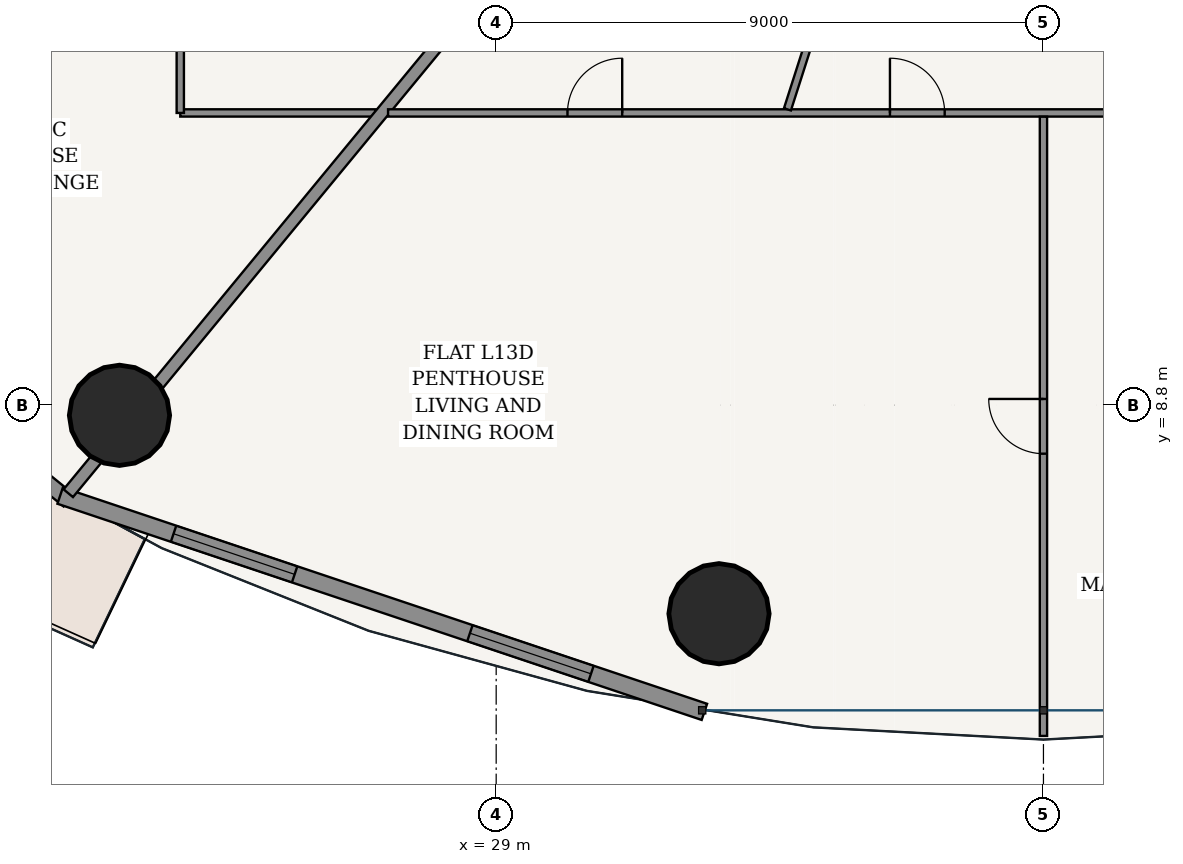
"""IFC4 building model, lengths in metres.
Left out: names, types, materials, properties, quantities, classifications, styles, units other than length and angle.
Written with IfcOpenShell. Run it as: python <this file> out.ifc"""

import sys

from ifc_helpers import new_model, si_unit, direction, frame, frame_2d, origin, origin_2d, place, context, subcontext, project, spatial, rectangle, hollow_circle, extrude, source, transform, mapped, element, fill, save


model = new_model("IFC4")
c1 = context("Model", 3, precision=1e-05, world=origin(), true_north=direction((-0.2419218956, 0.970295726276)))
c2 = subcontext(c1, "Body", "Model", "MODEL_VIEW")
j1 = project(units=[si_unit("LENGTHUNIT", "METRE"), si_unit("PLANEANGLEUNIT", "RADIAN")], contexts=[c1])
p1 = place(None, origin())
s1 = spatial("IfcSite", under=j1, at=p1, CompositionType="ELEMENT")
p2 = place(p1, origin())
s2 = spatial("IfcBuilding", under=s1, at=p2, CompositionType="ELEMENT")
p3 = place(p2, frame((0.0, 0.0, 52.8)))
s3 = spatial("IfcBuildingStorey", under=s2, at=p3, CompositionType="ELEMENT", Elevation=52.8)
for number, where, z_axis, x_axis in (
    (1, (22.805, 8.632, 0.0), (0.0, 0.0, 1.0), (1.0, 0.0, 0.0)),
    (2, (32.664, 5.37, 0.0), (0.0, 0.0, 1.0), (1.0, 0.0, 0.0)),
):
    element("IfcColumn", number, at=place(p3, frame(where, z_axis=z_axis, x_axis=x_axis)), inside=s3, PredefinedType="COLUMN", context=c2, shape_type="SweptSolid", body=[
        extrude(hollow_circle(Radius=0.825, WallThickness=0.05, at=origin_2d()), origin(), (0.0, 0.0, 1.0), 3.6),
    ])
p4 = place(p3, frame((13.85, 13.811, 0.0), z_axis=(0.0, 0.0, 1.0), x_axis=(0.777016782851, -0.629479879875, 0.0)))
e3 = element("IfcWall", 3, at=p4, inside=s3, PredefinedType="SOLIDWALL", context=c2, shape_type="SweptSolid", body=[
    extrude(rectangle(XDim=10.447, YDim=0.26, at=frame_2d((5.223, 0.0))), origin(), (0.0, 0.0, 1.0), 3.32),
])
p5 = place(p4, frame((4.548, 0.0, 0.0)))
e4 = element("IfcOpeningElement", 4, at=p5, cuts=e3, PredefinedType="OPENING", context=c2, shape_type="SweptSolid", body=[
    extrude(rectangle(XDim=1.35, YDim=2.2, at=frame_2d((0.675, 1.1))), frame((0.0, 0.14, 0.0), z_axis=(0.0, -1.0, 0.0), x_axis=(1.0, 0.0, 0.0)), (0.0, 0.0, 1.0), 0.28),
])
p6 = place(p3, frame((21.829, 7.311, 0.0), z_axis=(0.0, 0.0, 1.0), x_axis=(0.948047847546, -0.31812777113, 0.0)))
e5 = element("IfcWall", 5, at=p6, inside=s3, PredefinedType="SOLIDWALL", context=c2, shape_type="SweptSolid", body=[
    extrude(rectangle(XDim=11.175, YDim=0.28, at=frame_2d((5.588, 0.0))), origin(), (0.0, 0.0, 1.0), 3.32),
])
p7 = place(p6, frame((1.967, 0.0, 0.85)))
e6 = element("IfcOpeningElement", 6, at=p7, cuts=e5, PredefinedType="OPENING", context=c2, shape_type="SweptSolid", body=[
    extrude(rectangle(XDim=2.1, YDim=1.95, at=frame_2d((1.05, 0.975))), frame((0.0, 0.15, 0.0), z_axis=(0.0, -1.0, 0.0), x_axis=(1.0, 0.0, 0.0)), (0.0, 0.0, 1.0), 0.3),
])
p8 = place(p6, frame((7.108, 0.0, 0.85)))
e7 = element("IfcOpeningElement", 7, at=p8, cuts=e5, PredefinedType="OPENING", context=c2, shape_type="SweptSolid", body=[
    extrude(rectangle(XDim=2.1, YDim=1.95, at=frame_2d((1.05, 0.975))), frame((0.0, 0.15, 0.0), z_axis=(0.0, -1.0, 0.0), x_axis=(1.0, 0.0, 0.0)), (0.0, 0.0, 1.0), 0.3),
])
p9 = place(p3, frame((27.018, 13.605, 0.0), z_axis=(0.0, 0.0, 1.0), x_axis=(-1.0, 0.0, 0.0)))
e8 = element("IfcWall", 8, at=p9, inside=s3, PredefinedType="PARTITIONING", context=c2, shape_type="SweptSolid", body=[
    extrude(rectangle(XDim=3.213, YDim=0.12, at=frame_2d((1.606, 0.0))), origin(), (0.0, 0.0, 1.0), 2.688),
])
p10 = place(p3, frame((23.805, 13.605, 0.0), z_axis=(0.0, 0.0, 1.0), x_axis=(0.0, 1.0, 0.0)))
e9 = element("IfcWall", 9, at=p10, inside=s3, PredefinedType="PARTITIONING", context=c2, shape_type="SweptSolid", body=[
    extrude(rectangle(XDim=20.779, YDim=0.12, at=frame_2d((10.39, 0.0))), origin(), (0.0, 0.0, 1.0), 2.688),
])
p11 = place(p10, frame((2.425, 0.0, 0.0)))
e10 = element("IfcOpeningElement", 10, at=p11, cuts=e9, PredefinedType="OPENING", context=c2, shape_type="SweptSolid", body=[
    extrude(rectangle(XDim=0.9, YDim=2.15, at=frame_2d((0.45, 1.075))), frame((0.0, 0.07, 0.0), z_axis=(0.0, -1.0, 0.0), x_axis=(1.0, 0.0, 0.0)), (0.0, 0.0, 1.0), 0.14),
])
p12 = place(p10, frame((14.199, 0.0, 0.0)))
e11 = element("IfcOpeningElement", 11, at=p12, cuts=e9, PredefinedType="OPENING", context=c2, shape_type="SweptSolid", body=[
    extrude(rectangle(XDim=0.9, YDim=2.15, at=frame_2d((0.45, 1.075))), frame((0.0, 0.07, 0.0), z_axis=(0.0, -1.0, 0.0), x_axis=(1.0, 0.0, 0.0)), (0.0, 0.0, 1.0), 0.14),
])
p13 = place(p10, frame((17.908, 0.0, 0.0)))
e12 = element("IfcOpeningElement", 12, at=p13, cuts=e9, PredefinedType="OPENING", context=c2, shape_type="SweptSolid", body=[
    extrude(rectangle(XDim=0.9, YDim=2.15, at=frame_2d((0.45, 1.075))), frame((0.0, 0.07, 0.0), z_axis=(0.0, -1.0, 0.0), x_axis=(1.0, 0.0, 0.0)), (0.0, 0.0, 1.0), 0.14),
])
p14 = place(p3, frame((23.75, 19.084, 0.0), z_axis=(0.0, 0.0, 1.0), x_axis=(-0.879370672984, -0.476137815654, 0.0)))
e13 = element("IfcWall", 13, at=p14, inside=s3, PredefinedType="PARTITIONING", context=c2, shape_type="SweptSolid", body=[
    extrude(rectangle(XDim=11.094, YDim=0.12, at=frame_2d((5.547, 0.0))), origin(), (0.0, 0.0, 1.0), 2.688),
])
p15 = place(p14, frame((4.034, 0.0, 0.0)))
e14 = element("IfcOpeningElement", 14, at=p15, cuts=e13, PredefinedType="OPENING", context=c2, shape_type="SweptSolid", body=[
    extrude(rectangle(XDim=0.9, YDim=2.15, at=frame_2d((0.45, 1.075))), frame((0.0, 0.07, 0.0), z_axis=(0.0, -1.0, 0.0), x_axis=(1.0, 0.0, 0.0)), (0.0, 0.0, 1.0), 0.14),
])
p16 = place(p3, frame((29.396, 16.365, 0.0), z_axis=(0.0, 0.0, 1.0), x_axis=(-0.636186165667, -0.771535587393, 0.0)))
e15 = element("IfcWall", 15, at=p16, inside=s3, PredefinedType="PARTITIONING", context=c2, shape_type="SweptSolid", body=[
    extrude(rectangle(XDim=11.683, YDim=0.2, at=frame_2d((5.842, 0.0))), origin(), (0.0, 0.0, 1.0), 2.688),
])
p17 = place(p3, frame((52.195, 13.605, 0.0), z_axis=(0.0, 0.0, 1.0), x_axis=(-1.0, 0.0, 0.0)))
e16 = element("IfcWall", 16, at=p17, inside=s3, PredefinedType="PARTITIONING", context=c2, shape_type="SweptSolid", body=[
    extrude(rectangle(XDim=24.973, YDim=0.12, at=frame_2d((12.487, 0.0))), origin(), (0.0, 0.0, 1.0), 2.688),
])
p18 = place(p17, frame((3.841, 0.0, 0.0)))
e17 = element("IfcOpeningElement", 17, at=p18, cuts=e16, PredefinedType="OPENING", context=c2, shape_type="SweptSolid", body=[
    extrude(rectangle(XDim=0.9, YDim=2.15, at=frame_2d((0.45, 1.075))), frame((0.0, 0.07, 0.0), z_axis=(0.0, -1.0, 0.0), x_axis=(1.0, 0.0, 0.0)), (0.0, 0.0, 1.0), 0.14),
])
p19 = place(p17, frame((15.819, 0.0, 0.0)))
e18 = element("IfcOpeningElement", 18, at=p19, cuts=e16, PredefinedType="OPENING", context=c2, shape_type="SweptSolid", body=[
    extrude(rectangle(XDim=0.9, YDim=2.15, at=frame_2d((0.45, 1.075))), frame((0.0, 0.07, 0.0), z_axis=(0.0, -1.0, 0.0), x_axis=(1.0, 0.0, 0.0)), (0.0, 0.0, 1.0), 0.14),
])
p20 = place(p17, frame((21.123, 0.0, 0.0)))
e19 = element("IfcOpeningElement", 19, at=p20, cuts=e16, PredefinedType="OPENING", context=c2, shape_type="SweptSolid", body=[
    extrude(rectangle(XDim=0.9, YDim=2.15, at=frame_2d((0.45, 1.075))), frame((0.0, 0.07, 0.0), z_axis=(0.0, -1.0, 0.0), x_axis=(1.0, 0.0, 0.0)), (0.0, 0.0, 1.0), 0.14),
])
p21 = place(p3, frame((38.0, 13.543, 0.0), z_axis=(0.0, 0.0, 1.0), x_axis=(0.0, -1.0, 0.0)))
e20 = element("IfcWall", 20, at=p21, inside=s3, PredefinedType="PARTITIONING", context=c2, shape_type="SweptSolid", body=[
    extrude(rectangle(XDim=10.183, YDim=0.12, at=frame_2d((5.091, 0.0))), origin(), (0.0, 0.0, 1.0), 2.762),
])
p22 = place(p21, frame((4.642, 0.0, 0.0)))
e21 = element("IfcOpeningElement", 21, at=p22, cuts=e20, PredefinedType="OPENING", context=c2, shape_type="SweptSolid", body=[
    extrude(rectangle(XDim=0.9, YDim=2.15, at=frame_2d((0.45, 1.075))), frame((0.0, 0.07, 0.0), z_axis=(0.0, -1.0, 0.0), x_axis=(1.0, 0.0, 0.0)), (0.0, 0.0, 1.0), 0.14),
])
p23 = place(p3, frame((34.656, 16.365, 0.0), z_axis=(0.0, 0.0, 1.0), x_axis=(-0.305153630579, -0.952303135427, 0.0)))
e22 = element("IfcWall", 22, at=p23, inside=s3, PredefinedType="PARTITIONING", context=c2, shape_type="SweptSolid", body=[
    extrude(rectangle(XDim=2.836, YDim=0.12, at=frame_2d((1.418, 0.0))), origin(), (0.0, 0.0, 1.0), 3.32),
])
m1 = source(origin(), c2, "Body", "SweptSolid", [
    extrude(rectangle(XDim=2.1, YDim=1.95, at=frame_2d((1.05, 0.975))), frame((0.0, 0.03, 0.0), z_axis=(0.0, -1.0, 0.0), x_axis=(1.0, 0.0, 0.0)), (0.0, 0.0, 1.0), 0.06),
])
p24 = place(p7, origin())
e23 = element("IfcWindow", 23, at=p24, inside=s3, PartitioningType="SINGLE_PANEL", PredefinedType="WINDOW", context=c2, shape_type="MappedRepresentation", body=[
    mapped(m1, transform((0.0, 0.0, 0.0), scale=1.0)),
])
fill(e6, e23)
p25 = place(p8, origin())
e24 = element("IfcWindow", 24, at=p25, inside=s3, PartitioningType="SINGLE_PANEL", PredefinedType="WINDOW", context=c2, shape_type="MappedRepresentation", body=[
    mapped(m1, transform((0.0, 0.0, 0.0), scale=1.0)),
])
fill(e7, e24)
m2 = source(origin(), c2, "Body", "SweptSolid", [
    extrude(rectangle(XDim=0.9, YDim=2.15, at=frame_2d((0.45, 1.075))), frame((0.0, 0.025, 0.0), z_axis=(0.0, -1.0, 0.0), x_axis=(1.0, 0.0, 0.0)), (0.0, 0.0, 1.0), 0.05),
])
p26 = place(p22, frame((0.9, 0.0, 0.0), z_axis=(0.0, 0.0, 1.0), x_axis=(-1.0, 0.0, 0.0)))
e25 = element("IfcDoor", 25, at=p26, inside=s3, OperationType="SINGLE_SWING_RIGHT", PredefinedType="DOOR", context=c2, shape_type="MappedRepresentation", body=[
    mapped(m2, transform((0.0, 0.0, 0.0), scale=1.0)),
])
fill(e21, e25)
p27 = place(p19, frame((0.9, 0.0, 0.0), z_axis=(0.0, 0.0, 1.0), x_axis=(-1.0, 0.0, 0.0)))
e26 = element("IfcDoor", 26, at=p27, inside=s3, OperationType="SINGLE_SWING_LEFT", PredefinedType="DOOR", context=c2, shape_type="MappedRepresentation", body=[
    mapped(m2, transform((0.0, 0.0, 0.0), scale=1.0)),
])
fill(e18, e26)
p28 = place(p20, frame((0.9, 0.0, 0.0), z_axis=(0.0, 0.0, 1.0), x_axis=(-1.0, 0.0, 0.0)))
e27 = element("IfcDoor", 27, at=p28, inside=s3, OperationType="SINGLE_SWING_RIGHT", PredefinedType="DOOR", context=c2, shape_type="MappedRepresentation", body=[
    mapped(m2, transform((0.0, 0.0, 0.0), scale=1.0)),
])
fill(e19, e27)
save(model, sys.argv[1])
